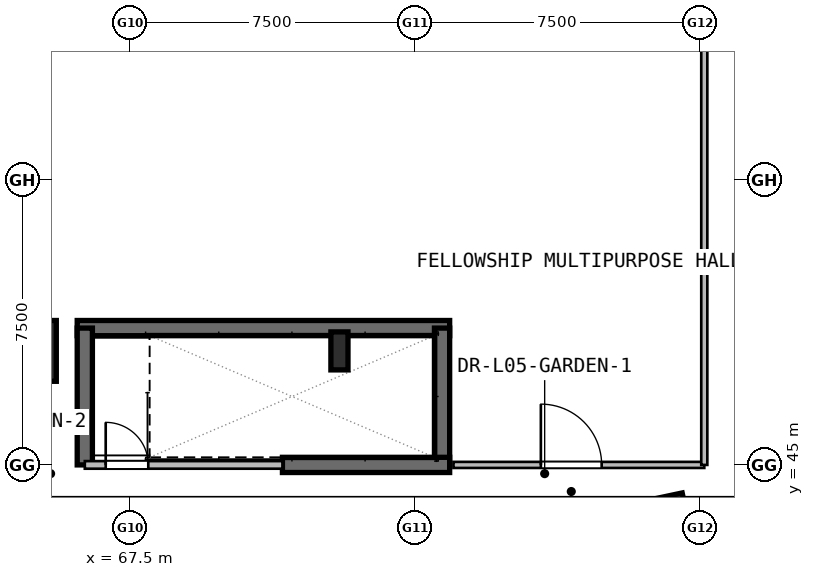
"""IFC4 building model, lengths in metres.
Left out: names, types, materials, properties, quantities, classifications, styles, units other than length and angle.
Written with IfcOpenShell. Run it as: python <this file> out.ifc"""

import sys

from ifc_helpers import new_model, si_unit, direction, frame, frame_2d, origin, origin_2d, place, context, subcontext, project, spatial, rectangle, hollow_rectangle, i_section, extrude, element, fill, save


model = new_model("IFC4")
c1 = context("Model", 3, precision=1e-05, world=origin(), true_north=direction((0.0, 1.0)))
c2 = subcontext(c1, "Body", "Model", "MODEL_VIEW")
j1 = project(units=[si_unit("LENGTHUNIT", "METRE"), si_unit("PLANEANGLEUNIT", "RADIAN")], contexts=[c1])
p1 = place(None, origin())
s1 = spatial("IfcSite", under=j1, at=p1, CompositionType="ELEMENT")
p2 = place(p1, origin())
s2 = spatial("IfcBuilding", under=s1, at=p2, CompositionType="ELEMENT")
p3 = place(p2, frame((0.0, 0.0, 25.2)))
s3 = spatial("IfcBuildingStorey", under=s2, at=p3, CompositionType="ELEMENT", Elevation=25.2)
for number, where, z_axis, x_axis in (
    (1, (64.75, 48.0, 0.0), (0.0, 0.0, 1.0), (1.0, 0.0, 0.0)),
    (2, (81.403, 43.313, 0.0), (0.0, 0.0, 1.0), (0.978, 0.208, 0.0)),
):
    element("IfcColumn", number, at=place(p3, frame(where, z_axis=z_axis, x_axis=x_axis)), inside=s3, PredefinedType="COLUMN", context=c2, shape_type="SweptSolid", body=[
        extrude(hollow_rectangle(XDim=1.6, YDim=1.6, WallThickness=0.04, at=origin_2d()), origin(), (0.0, 0.0, 1.0), 5.15),
    ])
p4 = place(p3, frame((73.0, 48.0, 0.0), z_axis=(0.0, 0.0, 1.0), x_axis=(1.0, 0.0, 0.0)))
e3 = element("IfcColumn", 3, at=p4, inside=s3, PredefinedType="COLUMN", context=c2, shape_type="SweptSolid", body=[
    extrude(i_section(OverallWidth=0.45, OverallDepth=1.0, WebThickness=0.022, FlangeThickness=0.04, at=origin_2d()), origin(), (0.0, 0.0, 1.0), 5.4),
])
p5 = place(p3, frame((66.1, 48.6, 0.0), z_axis=(0.0, 0.0, 1.0), x_axis=(1.0, 0.0, 0.0)))
e4 = element("IfcWall", 4, at=p5, inside=s3, PredefinedType="SHEAR", context=c2, shape_type="SweptSolid", body=[
    extrude(rectangle(XDim=9.8, YDim=0.4, at=frame_2d((4.9, 0.0))), origin(), (0.0, 0.0, 1.0), 5.4),
])
for number, where, z_axis, x_axis in (
    (5, (66.3, 45.0, 0.0), (0.0, 0.0, 1.0), (0.0, 1.0, 0.0)),
    (6, (75.7, 45.0, 0.0), (0.0, 0.0, 1.0), (0.0, 1.0, 0.0)),
):
    element("IfcWall", number, at=place(p3, frame(where, z_axis=z_axis, x_axis=x_axis)), inside=s3, PredefinedType="SHEAR", context=c2, shape_type="SweptSolid", body=[
        extrude(rectangle(XDim=3.6, YDim=0.4, at=frame_2d((1.8, 0.0))), origin(), (0.0, 0.0, 1.0), 5.4),
    ])
p6 = place(p3, frame((71.5, 45.0, 0.0), z_axis=(0.0, 0.0, 1.0), x_axis=(1.0, 0.0, 0.0)))
e7 = element("IfcWall", 7, at=p6, inside=s3, PredefinedType="SHEAR", context=c2, shape_type="SweptSolid", body=[
    extrude(rectangle(XDim=4.4, YDim=0.4, at=frame_2d((2.2, 0.0))), origin(), (0.0, 0.0, 1.0), 5.4),
])
p7 = place(p3, frame((86.5, 44.0, 0.0), z_axis=(0.0, 0.0, 1.0), x_axis=(-1.0, 0.0, 0.0)))
e8 = element("IfcWall", 8, at=p7, inside=s3, PredefinedType="SOLIDWALL", context=c2, shape_type="SweptSolid", body=[
    extrude(rectangle(XDim=31.0, YDim=0.3, at=frame_2d((15.5, 0.0))), origin(), (0.0, 0.0, 1.0), 2.63),
])
p8 = place(p7, frame((7.5, 0.0, 0.0)))
e9 = element("IfcOpeningElement", 9, at=p8, cuts=e8, PredefinedType="OPENING", context=c2, shape_type="SweptSolid", body=[
    extrude(rectangle(XDim=1.2, YDim=2.15, at=frame_2d((0.6, 1.075))), frame((0.0, 0.16, 0.0), z_axis=(0.0, -1.0, 0.0), x_axis=(1.0, 0.0, 0.0)), (0.0, 0.0, 1.0), 0.32),
])
p9 = place(p7, frame((20.5, 0.0, 0.0)))
e10 = element("IfcOpeningElement", 10, at=p9, cuts=e8, PredefinedType="OPENING", context=c2, shape_type="SweptSolid", body=[
    extrude(rectangle(XDim=1.2, YDim=2.15, at=frame_2d((0.6, 1.075))), frame((0.0, 0.16, 0.0), z_axis=(0.0, -1.0, 0.0), x_axis=(1.0, 0.0, 0.0)), (0.0, 0.0, 1.0), 0.32),
])
p10 = place(p3, frame((66.3, 45.0, 0.0), z_axis=(0.0, 0.0, 1.0), x_axis=(1.0, 0.0, 0.0)))
e11 = element("IfcWall", 11, at=p10, inside=s3, PredefinedType="PARTITIONING", context=c2, shape_type="SweptSolid", body=[
    extrude(rectangle(XDim=5.2, YDim=0.2, at=frame_2d((2.6, 0.0))), origin(), (0.0, 0.0, 1.0), 5.13),
])
p11 = place(p10, frame((0.55, 0.0, 0.0)))
e12 = element("IfcOpeningElement", 12, at=p11, cuts=e11, PredefinedType="OPENING", context=c2, shape_type="SweptSolid", body=[
    extrude(rectangle(XDim=1.12, YDim=2.1, at=frame_2d((0.56, 1.05))), frame((0.0, 0.11, 0.0), z_axis=(0.0, -1.0, 0.0), x_axis=(1.0, 0.0, 0.0)), (0.0, 0.0, 1.0), 0.22),
])
p12 = place(p3, frame((76.0, 45.0, 0.0), z_axis=(0.0, 0.0, 1.0), x_axis=(1.0, 0.0, 0.0)))
e13 = element("IfcWall", 13, at=p12, inside=s3, PredefinedType="PARTITIONING", context=c2, shape_type="SweptSolid", body=[
    extrude(rectangle(XDim=6.6, YDim=0.16, at=frame_2d((3.3, 0.0))), origin(), (0.0, 0.0, 1.0), 5.13),
])
p13 = place(p12, frame((2.3, 0.0, 0.0)))
e14 = element("IfcOpeningElement", 14, at=p13, cuts=e13, PredefinedType="OPENING", context=c2, shape_type="SweptSolid", body=[
    extrude(rectangle(XDim=1.6, YDim=2.2, at=frame_2d((0.8, 1.1))), frame((0.0, 0.09, 0.0), z_axis=(0.0, -1.0, 0.0), x_axis=(1.0, 0.0, 0.0)), (0.0, 0.0, 1.0), 0.18),
])
p14 = place(p3, frame((82.6, 45.0, 0.0), z_axis=(0.0, 0.0, 1.0), x_axis=(0.0, 1.0, 0.0)))
e15 = element("IfcWall", 15, at=p14, inside=s3, PredefinedType="PARTITIONING", context=c2, shape_type="SweptSolid", body=[
    extrude(rectangle(XDim=11.05, YDim=0.16, at=frame_2d((5.525, 0.0))), origin(), (0.0, 0.0, 1.0), 5.13),
])
p15 = place(p11, origin())
e16 = element("IfcDoor", 16, at=p15, inside=s3, OperationType="SINGLE_SWING_RIGHT", PredefinedType="DOOR", context=c2, shape_type="SweptSolid", body=[
    extrude(rectangle(XDim=1.12, YDim=2.1, at=frame_2d((0.56, 1.05))), frame((0.0, 0.025, 0.0), z_axis=(0.0, -1.0, 0.0), x_axis=(1.0, 0.0, 0.0)), (0.0, 0.0, 1.0), 0.05),
])
fill(e12, e16)
p16 = place(p13, origin())
e17 = element("IfcDoor", 17, at=p16, inside=s3, OperationType="DOUBLE_DOOR_SINGLE_SWING", PredefinedType="DOOR", context=c2, shape_type="SweptSolid", body=[
    extrude(rectangle(XDim=1.6, YDim=2.2, at=frame_2d((0.8, 1.1))), frame((0.0, 0.025, 0.0), z_axis=(0.0, -1.0, 0.0), x_axis=(1.0, 0.0, 0.0)), (0.0, 0.0, 1.0), 0.05),
])
fill(e14, e17)
save(model, sys.argv[1])
